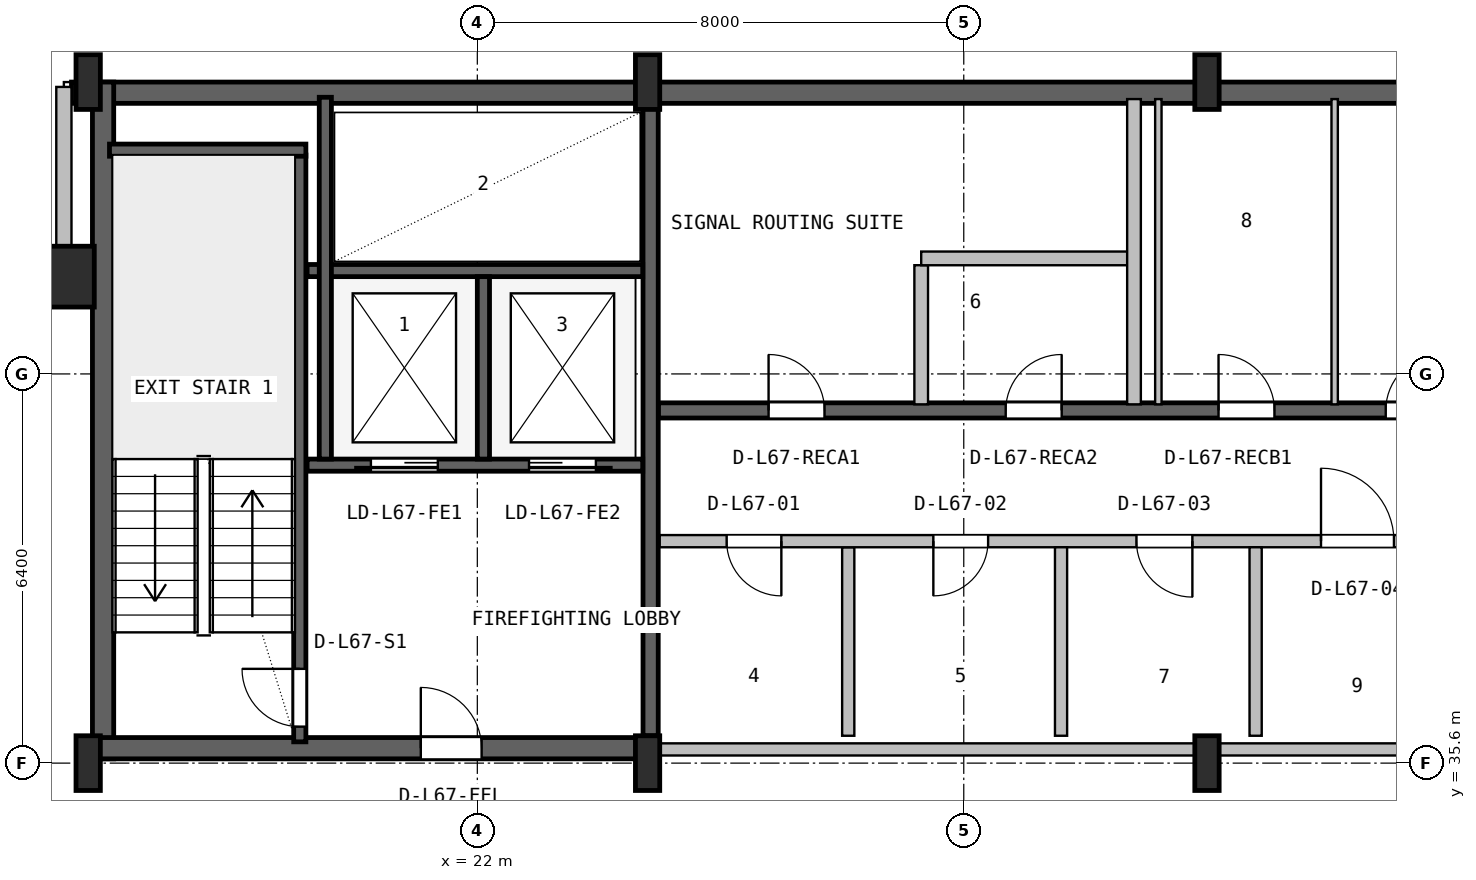
"""IFC4 building model, lengths in metres.
Left out: names, types, materials, properties, quantities, classifications, styles, units other than length and angle.
Written with IfcOpenShell. Run it as: python <this file> out.ifc"""

import sys

from ifc_helpers import new_model, si_unit, direction, frame, frame_2d, origin, origin_2d, place, context, subcontext, project, spatial, rectangle, hollow_rectangle, i_section, extrude, source, transform, mapped, element, fill, save


model = new_model("IFC4")
c1 = context("Model", 3, precision=1e-05, world=origin(), true_north=direction((0.0, 1.0)))
c2 = subcontext(c1, "Body", "Model", "MODEL_VIEW")
j1 = project(units=[si_unit("LENGTHUNIT", "METRE"), si_unit("PLANEANGLEUNIT", "RADIAN")], contexts=[c1])
p1 = place(None, origin())
s1 = spatial("IfcSite", under=j1, at=p1, CompositionType="ELEMENT")
p2 = place(p1, origin())
s2 = spatial("IfcBuilding", under=s1, at=p2, CompositionType="ELEMENT")
p3 = place(p2, frame((0.0, 0.0, 269.8)))
s3 = spatial("IfcBuildingStorey", under=s2, at=p3, CompositionType="ELEMENT", Elevation=269.8)
p4 = place(p3, frame((15.325, 46.625, 0.0), z_axis=(0.0, 0.0, 1.0), x_axis=(1.0, 0.0, 0.0)))
e1 = element("IfcWall", 1, at=p4, inside=s3, PredefinedType="SHEAR", context=c2, shape_type="SweptSolid", body=[
    extrude(rectangle(XDim=37.35, YDim=0.35, at=frame_2d((18.675, 0.0))), origin(), (0.0, 0.0, 1.0), 3.55),
])
p5 = place(p3, frame((15.845, 35.67, 0.0), z_axis=(0.0, 0.0, 1.0), x_axis=(0.0, 1.0, 0.0)))
e2 = element("IfcWall", 2, at=p5, inside=s3, PredefinedType="SHEAR", context=c2, shape_type="SweptSolid", body=[
    extrude(rectangle(XDim=11.13, YDim=0.35, at=frame_2d((5.565, 0.0))), origin(), (0.0, 0.0, 1.0), 3.55),
])
p6 = place(p3, frame((15.67, 35.845, 0.0), z_axis=(0.0, 0.0, 1.0), x_axis=(1.0, 0.0, 0.0)))
e3 = element("IfcWall", 3, at=p6, inside=s3, PredefinedType="SHEAR", context=c2, shape_type="SweptSolid", body=[
    extrude(rectangle(XDim=9.13, YDim=0.35, at=frame_2d((4.565, 0.0))), origin(), (0.0, 0.0, 1.0), 3.55),
])
p7 = place(p6, frame((5.4, 0.0, 0.0)))
e4 = element("IfcOpeningElement", 4, at=p7, cuts=e3, PredefinedType="OPENING", context=c2, shape_type="SweptSolid", body=[
    extrude(rectangle(XDim=1.0, YDim=2.1, at=frame_2d((0.5, 1.05))), frame((0.0, 0.185, 0.0), z_axis=(0.0, -1.0, 0.0), x_axis=(1.0, 0.0, 0.0)), (0.0, 0.0, 1.0), 0.37),
])
m1 = source(origin(), c2, "Body", "SweptSolid", [
    extrude(i_section(OverallWidth=0.4, OverallDepth=0.9, WebThickness=0.016, FlangeThickness=0.028, FilletRadius=0.016, at=origin_2d()), origin(), (0.0, 0.0, 1.0), 3.8),
])
for number, where, z_axis, x_axis in (
    (5, (15.6, 35.6, 0.0), (0.0, 0.0, 1.0), (1.0, 0.0, 0.0)),
    (6, (15.6, 46.8, 0.0), (0.0, 0.0, 1.0), (1.0, 0.0, 0.0)),
    (7, (24.8, 35.6, 0.0), (0.0, 0.0, 1.0), (1.0, 0.0, 0.0)),
    (8, (24.8, 46.8, 0.0), (0.0, 0.0, 1.0), (1.0, 0.0, 0.0)),
    (9, (34.0, 35.6, 0.0), (0.0, 0.0, 1.0), (1.0, 0.0, 0.0)),
    (10, (34.0, 46.8, 0.0), (0.0, 0.0, 1.0), (1.0, 0.0, 0.0)),
):
    element("IfcColumn", number, at=place(p3, frame(where, z_axis=z_axis, x_axis=x_axis)), inside=s3, PredefinedType="COLUMN", context=c2, shape_type="MappedRepresentation", body=[
        mapped(m1, transform((0.0, 0.0, 0.0), x_axis=(1.0, 0.0, 0.0), y_axis=(0.0, 1.0, 0.0), z_axis=(0.0, 0.0, 1.0), scale=1.0)),
    ])
m2 = source(origin(), c2, "Body", "SweptSolid", [
    extrude(hollow_rectangle(XDim=1.0, YDim=1.0, WallThickness=0.04, at=origin_2d()), origin(), (0.0, 0.0, 1.0), 3.8),
])
p8 = place(p3, frame((15.2, 43.6, 0.0), z_axis=(0.0, 0.0, 1.0), x_axis=(1.0, 0.0, 0.0)))
e11 = element("IfcColumn", 11, at=p8, inside=s3, PredefinedType="COLUMN", context=c2, shape_type="MappedRepresentation", body=[
    mapped(m2, transform((0.0, 0.0, 0.0), x_axis=(1.0, 0.0, 0.0), y_axis=(0.0, 1.0, 0.0), z_axis=(0.0, 0.0, 1.0), scale=1.0)),
])
p9 = place(p3, frame((12.08, 43.6, 0.0), z_axis=(0.0, 0.0, 1.0), x_axis=(1.0, 0.0, 0.0)))
e12 = element("IfcWall", 12, at=p9, inside=s3, PredefinedType="SOLIDWALL", context=c2, shape_type="SweptSolid", body=[
    extrude(rectangle(XDim=2.99, YDim=0.25, at=frame_2d((1.495, 0.0))), origin(), (0.0, 0.0, 1.0), 3.53),
])
p10 = place(p3, frame((15.2, 43.52, 0.0), z_axis=(0.0, 0.0, 1.0), x_axis=(0.0, 1.0, 0.0)))
e13 = element("IfcWall", 13, at=p10, inside=s3, PredefinedType="SOLIDWALL", context=c2, shape_type="SweptSolid", body=[
    extrude(rectangle(XDim=3.2, YDim=0.25, at=frame_2d((1.6, 0.0))), origin(), (0.0, 0.0, 1.0), 3.171),
])
p11 = place(p3, frame((19.08, 35.95, 0.0), z_axis=(0.0, 0.0, 1.0), x_axis=(0.0, 1.0, 0.0)))
e14 = element("IfcWall", 14, at=p11, inside=s3, PredefinedType="SHEAR", context=c2, shape_type="SweptSolid", body=[
    extrude(rectangle(XDim=9.65, YDim=0.2, at=frame_2d((4.825, 0.0))), origin(), (0.0, 0.0, 1.0), 3.55),
])
p12 = place(p11, frame((0.25, 0.0, 0.0)))
e15 = element("IfcOpeningElement", 15, at=p12, cuts=e14, PredefinedType="OPENING", context=c2, shape_type="SweptSolid", body=[
    extrude(rectangle(XDim=0.95, YDim=2.1, at=frame_2d((0.475, 1.05))), frame((0.0, 0.11, 0.0), z_axis=(0.0, -1.0, 0.0), x_axis=(1.0, 0.0, 0.0)), (0.0, 0.0, 1.0), 0.22),
])
p13 = place(p3, frame((15.95, 45.68, 0.0), z_axis=(0.0, 0.0, 1.0), x_axis=(1.0, 0.0, 0.0)))
e16 = element("IfcWall", 16, at=p13, inside=s3, PredefinedType="SHEAR", context=c2, shape_type="SweptSolid", body=[
    extrude(rectangle(XDim=3.23, YDim=0.2, at=frame_2d((1.615, 0.0))), origin(), (0.0, 0.0, 1.0), 3.55),
])
p14 = place(p3, frame((24.85, 36.05, 0.0), z_axis=(0.0, 0.0, 1.0), x_axis=(0.0, 1.0, 0.0)))
e17 = element("IfcWall", 17, at=p14, inside=s3, PredefinedType="SHEAR", context=c2, shape_type="SweptSolid", body=[
    extrude(rectangle(XDim=10.45, YDim=0.25, at=frame_2d((5.225, 0.0))), origin(), (0.0, 0.0, 1.0), 3.55),
])
p15 = place(p3, frame((19.2, 40.5, 0.0), z_axis=(0.0, 0.0, 1.0), x_axis=(1.0, 0.0, 0.0)))
e18 = element("IfcWall", 18, at=p15, inside=s3, PredefinedType="SHEAR", context=c2, shape_type="SweptSolid", body=[
    extrude(rectangle(XDim=5.52, YDim=0.2, at=frame_2d((2.76, 0.0))), origin(), (0.0, 0.0, 1.0), 3.55),
])
p16 = place(p15, frame((1.05, 0.0, 0.0)))
e19 = element("IfcOpeningElement", 19, at=p16, cuts=e18, PredefinedType="OPENING", context=c2, shape_type="SweptSolid", body=[
    extrude(rectangle(XDim=1.1, YDim=2.18, at=frame_2d((0.55, 1.09))), frame((0.0, 0.11, 0.0), z_axis=(0.0, -1.0, 0.0), x_axis=(1.0, 0.0, 0.0)), (0.0, 0.0, 1.0), 0.22),
])
p17 = place(p15, frame((3.65, 0.0, 0.0)))
e20 = element("IfcOpeningElement", 20, at=p17, cuts=e18, PredefinedType="OPENING", context=c2, shape_type="SweptSolid", body=[
    extrude(rectangle(XDim=1.1, YDim=2.18, at=frame_2d((0.55, 1.09))), frame((0.0, 0.11, 0.0), z_axis=(0.0, -1.0, 0.0), x_axis=(1.0, 0.0, 0.0)), (0.0, 0.0, 1.0), 0.22),
])
p18 = place(p3, frame((19.2, 43.7, 0.0), z_axis=(0.0, 0.0, 1.0), x_axis=(1.0, 0.0, 0.0)))
e21 = element("IfcWall", 21, at=p18, inside=s3, PredefinedType="SHEAR", context=c2, shape_type="SweptSolid", body=[
    extrude(rectangle(XDim=5.52, YDim=0.2, at=frame_2d((2.76, 0.0))), origin(), (0.0, 0.0, 1.0), 3.55),
])
p19 = place(p3, frame((22.1, 40.6, 0.0), z_axis=(0.0, 0.0, 1.0), x_axis=(0.0, 1.0, 0.0)))
e22 = element("IfcWall", 22, at=p19, inside=s3, PredefinedType="SHEAR", context=c2, shape_type="SweptSolid", body=[
    extrude(rectangle(XDim=3.0, YDim=0.2, at=frame_2d((1.5, 0.0))), origin(), (0.0, 0.0, 1.0), 3.55),
])
p20 = place(p3, frame((19.5, 40.6, 0.0), z_axis=(0.0, 0.0, 1.0), x_axis=(0.0, 1.0, 0.0)))
e23 = element("IfcWall", 23, at=p20, inside=s3, PredefinedType="SHEAR", context=c2, shape_type="SweptSolid", body=[
    extrude(rectangle(XDim=5.95, YDim=0.2, at=frame_2d((2.975, 0.0))), origin(), (0.0, 0.0, 1.0), 3.55),
])
p21 = place(p3, frame((24.98, 41.4, 0.0), z_axis=(0.0, 0.0, 1.0), x_axis=(1.0, 0.0, 0.0)))
e24 = element("IfcWall", 24, at=p21, inside=s3, PredefinedType="SHEAR", context=c2, shape_type="SweptSolid", body=[
    extrude(rectangle(XDim=23.82, YDim=0.25, at=frame_2d((11.91, 0.0))), origin(), (0.0, 0.0, 1.0), 3.55),
])
p22 = place(p21, frame((16.87, 0.0, 0.0)))
e25 = element("IfcOpeningElement", 25, at=p22, cuts=e24, PredefinedType="OPENING", context=c2, shape_type="SweptSolid", body=[
    extrude(rectangle(XDim=1.1, YDim=2.18, at=frame_2d((0.55, 1.09))), frame((0.0, 0.135, 0.0), z_axis=(0.0, -1.0, 0.0), x_axis=(1.0, 0.0, 0.0)), (0.0, 0.0, 1.0), 0.27),
])
p23 = place(p21, frame((19.47, 0.0, 0.0)))
e26 = element("IfcOpeningElement", 26, at=p23, cuts=e24, PredefinedType="OPENING", context=c2, shape_type="SweptSolid", body=[
    extrude(rectangle(XDim=1.1, YDim=2.18, at=frame_2d((0.55, 1.09))), frame((0.0, 0.135, 0.0), z_axis=(0.0, -1.0, 0.0), x_axis=(1.0, 0.0, 0.0)), (0.0, 0.0, 1.0), 0.27),
])
p24 = place(p21, frame((22.07, 0.0, 0.0)))
e27 = element("IfcOpeningElement", 27, at=p24, cuts=e24, PredefinedType="OPENING", context=c2, shape_type="SweptSolid", body=[
    extrude(rectangle(XDim=1.1, YDim=2.18, at=frame_2d((0.55, 1.09))), frame((0.0, 0.135, 0.0), z_axis=(0.0, -1.0, 0.0), x_axis=(1.0, 0.0, 0.0)), (0.0, 0.0, 1.0), 0.27),
])
p25 = place(p21, frame((1.81, 0.0, 0.0)))
e28 = element("IfcOpeningElement", 28, at=p25, cuts=e24, PredefinedType="OPENING", context=c2, shape_type="SweptSolid", body=[
    extrude(rectangle(XDim=0.92, YDim=2.08, at=frame_2d((0.46, 1.04))), frame((0.0, 0.135, 0.0), z_axis=(0.0, -1.0, 0.0), x_axis=(1.0, 0.0, 0.0)), (0.0, 0.0, 1.0), 0.27),
])
p26 = place(p21, frame((5.71, 0.0, 0.0)))
e29 = element("IfcOpeningElement", 29, at=p26, cuts=e24, PredefinedType="OPENING", context=c2, shape_type="SweptSolid", body=[
    extrude(rectangle(XDim=0.92, YDim=2.08, at=frame_2d((0.46, 1.04))), frame((0.0, 0.135, 0.0), z_axis=(0.0, -1.0, 0.0), x_axis=(1.0, 0.0, 0.0)), (0.0, 0.0, 1.0), 0.27),
])
p27 = place(p21, frame((9.21, 0.0, 0.0)))
e30 = element("IfcOpeningElement", 30, at=p27, cuts=e24, PredefinedType="OPENING", context=c2, shape_type="SweptSolid", body=[
    extrude(rectangle(XDim=0.92, YDim=2.08, at=frame_2d((0.46, 1.04))), frame((0.0, 0.135, 0.0), z_axis=(0.0, -1.0, 0.0), x_axis=(1.0, 0.0, 0.0)), (0.0, 0.0, 1.0), 0.27),
])
p28 = place(p21, frame((11.96, 0.0, 0.0)))
e31 = element("IfcOpeningElement", 31, at=p28, cuts=e24, PredefinedType="OPENING", context=c2, shape_type="SweptSolid", body=[
    extrude(rectangle(XDim=0.92, YDim=2.08, at=frame_2d((0.46, 1.04))), frame((0.0, 0.135, 0.0), z_axis=(0.0, -1.0, 0.0), x_axis=(1.0, 0.0, 0.0)), (0.0, 0.0, 1.0), 0.27),
])
p29 = place(p21, frame((14.31, 0.0, 0.0)))
e32 = element("IfcOpeningElement", 32, at=p29, cuts=e24, PredefinedType="OPENING", context=c2, shape_type="SweptSolid", body=[
    extrude(rectangle(XDim=0.92, YDim=2.08, at=frame_2d((0.46, 1.04))), frame((0.0, 0.135, 0.0), z_axis=(0.0, -1.0, 0.0), x_axis=(1.0, 0.0, 0.0)), (0.0, 0.0, 1.0), 0.27),
])
p30 = place(p3, frame((25.0, 35.825, 0.0), z_axis=(0.0, 0.0, 1.0), x_axis=(1.0, 0.0, 0.0)))
e33 = element("IfcWall", 33, at=p30, inside=s3, PredefinedType="SOLIDWALL", context=c2, shape_type="SweptSolid", body=[
    extrude(rectangle(XDim=12.95, YDim=0.2, at=frame_2d((6.475, 0.0))), origin(), (0.0, 0.0, 1.0), 2.575),
])
p31 = place(p3, frame((28.1, 36.05, 0.0), z_axis=(0.0, 0.0, 1.0), x_axis=(0.0, 1.0, 0.0)))
e34 = element("IfcWall", 34, at=p31, inside=s3, PredefinedType="PLUMBINGWALL", context=c2, shape_type="SweptSolid", body=[
    extrude(rectangle(XDim=3.1, YDim=0.2, at=frame_2d((1.55, 0.0))), origin(), (0.0, 0.0, 1.0), 3.53),
])
p32 = place(p3, frame((25.0, 39.25, 0.0), z_axis=(0.0, 0.0, 1.0), x_axis=(1.0, 0.0, 0.0)))
e35 = element("IfcWall", 35, at=p32, inside=s3, PredefinedType="SOLIDWALL", context=c2, shape_type="SweptSolid", body=[
    extrude(rectangle(XDim=12.95, YDim=0.2, at=frame_2d((6.475, 0.0))), origin(), (0.0, 0.0, 1.0), 3.53),
])
p33 = place(p32, frame((1.1, 0.0, 0.0)))
e36 = element("IfcOpeningElement", 36, at=p33, cuts=e35, PredefinedType="OPENING", context=c2, shape_type="SweptSolid", body=[
    extrude(rectangle(XDim=0.9, YDim=2.06, at=frame_2d((0.45, 1.03))), frame((0.0, 0.11, 0.0), z_axis=(0.0, -1.0, 0.0), x_axis=(1.0, 0.0, 0.0)), (0.0, 0.0, 1.0), 0.22),
])
p34 = place(p32, frame((4.5, 0.0, 0.0)))
e37 = element("IfcOpeningElement", 37, at=p34, cuts=e35, PredefinedType="OPENING", context=c2, shape_type="SweptSolid", body=[
    extrude(rectangle(XDim=0.9, YDim=2.06, at=frame_2d((0.45, 1.03))), frame((0.0, 0.11, 0.0), z_axis=(0.0, -1.0, 0.0), x_axis=(1.0, 0.0, 0.0)), (0.0, 0.0, 1.0), 0.22),
])
p35 = place(p32, frame((7.84, 0.0, 0.0)))
e38 = element("IfcOpeningElement", 38, at=p35, cuts=e35, PredefinedType="OPENING", context=c2, shape_type="SweptSolid", body=[
    extrude(rectangle(XDim=0.92, YDim=2.08, at=frame_2d((0.46, 1.04))), frame((0.0, 0.11, 0.0), z_axis=(0.0, -1.0, 0.0), x_axis=(1.0, 0.0, 0.0)), (0.0, 0.0, 1.0), 0.22),
])
p36 = place(p32, frame((10.875, 0.0, 0.0)))
e39 = element("IfcOpeningElement", 39, at=p36, cuts=e35, PredefinedType="OPENING", context=c2, shape_type="SweptSolid", body=[
    extrude(rectangle(XDim=1.2, YDim=2.1, at=frame_2d((0.6, 1.05))), frame((0.0, 0.11, 0.0), z_axis=(0.0, -1.0, 0.0), x_axis=(1.0, 0.0, 0.0)), (0.0, 0.0, 1.0), 0.22),
])
p37 = place(p3, frame((31.6, 36.05, 0.0), z_axis=(0.0, 0.0, 1.0), x_axis=(0.0, 1.0, 0.0)))
e40 = element("IfcWall", 40, at=p37, inside=s3, PredefinedType="PLUMBINGWALL", context=c2, shape_type="SweptSolid", body=[
    extrude(rectangle(XDim=3.1, YDim=0.2, at=frame_2d((1.55, 0.0))), origin(), (0.0, 0.0, 1.0), 3.53),
])
p38 = place(p3, frame((34.8, 36.05, 0.0), z_axis=(0.0, 0.0, 1.0), x_axis=(0.0, 1.0, 0.0)))
e41 = element("IfcWall", 41, at=p38, inside=s3, PredefinedType="SOLIDWALL", context=c2, shape_type="SweptSolid", body=[
    extrude(rectangle(XDim=3.1, YDim=0.2, at=frame_2d((1.55, 0.0))), origin(), (0.0, 0.0, 1.0), 3.53),
])
p39 = place(p3, frame((29.3, 41.5, 0.0), z_axis=(0.0, 0.0, 1.0), x_axis=(0.0, 1.0, 0.0)))
e42 = element("IfcWall", 42, at=p39, inside=s3, PredefinedType="PARTITIONING", context=c2, shape_type="SweptSolid", body=[
    extrude(rectangle(XDim=2.288, YDim=0.225, at=frame_2d((1.144, 0.0))), origin(), (0.0, 0.0, 1.0), 3.53),
])
p40 = place(p3, frame((29.3, 43.9, 0.0), z_axis=(0.0, 0.0, 1.0), x_axis=(1.0, 0.0, 0.0)))
e43 = element("IfcWall", 43, at=p40, inside=s3, PredefinedType="PARTITIONING", context=c2, shape_type="SweptSolid", body=[
    extrude(rectangle(XDim=3.5, YDim=0.225, at=frame_2d((1.75, 0.0))), origin(), (0.0, 0.0, 1.0), 3.53),
])
p41 = place(p3, frame((32.8, 41.5, 0.0), z_axis=(0.0, 0.0, 1.0), x_axis=(0.0, 1.0, 0.0)))
e44 = element("IfcWall", 44, at=p41, inside=s3, PredefinedType="PARTITIONING", context=c2, shape_type="SweptSolid", body=[
    extrude(rectangle(XDim=5.02, YDim=0.225, at=frame_2d((2.51, 0.0))), origin(), (0.0, 0.0, 1.0), 3.53),
])
for number, where, z_axis, x_axis in (
    (45, (36.1, 41.5, 0.0), (0.0, 0.0, 1.0), (0.0, 1.0, 0.0)),
    (46, (33.2, 41.5, 0.0), (0.0, 0.0, 1.0), (0.0, 1.0, 0.0)),
):
    element("IfcWall", number, at=place(p3, frame(where, z_axis=z_axis, x_axis=x_axis)), inside=s3, PredefinedType="PARTITIONING", context=c2, shape_type="SweptSolid", body=[
        extrude(rectangle(XDim=5.02, YDim=0.105, at=frame_2d((2.51, 0.0))), origin(), (0.0, 0.0, 1.0), 3.53),
    ])
m3 = source(origin(), c2, "Body", "SweptSolid", [
    extrude(rectangle(XDim=0.95, YDim=2.1, at=frame_2d((0.475, 1.05))), frame((0.0, 0.025, 0.0), z_axis=(0.0, -1.0, 0.0), x_axis=(1.0, 0.0, 0.0)), (0.0, 0.0, 1.0), 0.05),
])
p42 = place(p12, origin())
e47 = element("IfcDoor", 47, at=p42, inside=s3, OperationType="SINGLE_SWING_RIGHT", PredefinedType="DOOR", context=c2, shape_type="MappedRepresentation", body=[
    mapped(m3, transform((0.0, 0.0, 0.0), x_axis=(1.0, 0.0, 0.0), y_axis=(0.0, 1.0, 0.0), z_axis=(0.0, 0.0, 1.0), scale=1.0)),
])
fill(e15, e47)
m4 = source(origin(), c2, "Body", "SweptSolid", [
    extrude(rectangle(XDim=1.0, YDim=2.1, at=frame_2d((0.5, 1.05))), frame((0.0, 0.025, 0.0), z_axis=(0.0, -1.0, 0.0), x_axis=(1.0, 0.0, 0.0)), (0.0, 0.0, 1.0), 0.05),
])
p43 = place(p7, origin())
e48 = element("IfcDoor", 48, at=p43, inside=s3, OperationType="SINGLE_SWING_LEFT", PredefinedType="DOOR", context=c2, shape_type="MappedRepresentation", body=[
    mapped(m4, transform((0.0, 0.0, 0.0), x_axis=(1.0, 0.0, 0.0), y_axis=(0.0, 1.0, 0.0), z_axis=(0.0, 0.0, 1.0), scale=1.0)),
])
fill(e4, e48)
m5 = source(origin(), c2, "Body", "SweptSolid", [
    extrude(rectangle(XDim=1.1, YDim=2.18, at=frame_2d((0.55, 1.09))), frame((0.0, 0.025, 0.0), z_axis=(0.0, -1.0, 0.0), x_axis=(1.0, 0.0, 0.0)), (0.0, 0.0, 1.0), 0.05),
])
p44 = place(p16, frame((1.1, 0.0, 0.0), z_axis=(0.0, 0.0, 1.0), x_axis=(-1.0, 0.0, 0.0)))
e49 = element("IfcDoor", 49, at=p44, inside=s3, OperationType="SLIDING_TO_LEFT", PredefinedType="DOOR", context=c2, shape_type="MappedRepresentation", body=[
    mapped(m5, transform((0.0, 0.0, 0.0), x_axis=(1.0, 0.0, 0.0), y_axis=(0.0, 1.0, 0.0), z_axis=(0.0, 0.0, 1.0), scale=1.0)),
])
fill(e19, e49)
p45 = place(p17, frame((1.1, 0.0, 0.0), z_axis=(0.0, 0.0, 1.0), x_axis=(-1.0, 0.0, 0.0)))
e50 = element("IfcDoor", 50, at=p45, inside=s3, OperationType="SLIDING_TO_RIGHT", PredefinedType="DOOR", context=c2, shape_type="MappedRepresentation", body=[
    mapped(m5, transform((0.0, 0.0, 0.0), x_axis=(1.0, 0.0, 0.0), y_axis=(0.0, 1.0, 0.0), z_axis=(0.0, 0.0, 1.0), scale=1.0)),
])
fill(e20, e50)
m6 = source(origin(), c2, "Body", "SweptSolid", [
    extrude(rectangle(XDim=0.92, YDim=2.08, at=frame_2d((0.46, 1.04))), frame((0.0, 0.025, 0.0), z_axis=(0.0, -1.0, 0.0), x_axis=(1.0, 0.0, 0.0)), (0.0, 0.0, 1.0), 0.05),
])
p46 = place(p25, origin())
e51 = element("IfcDoor", 51, at=p46, inside=s3, OperationType="SINGLE_SWING_LEFT", PredefinedType="DOOR", context=c2, shape_type="MappedRepresentation", body=[
    mapped(m6, transform((0.0, 0.0, 0.0), x_axis=(1.0, 0.0, 0.0), y_axis=(0.0, 1.0, 0.0), z_axis=(0.0, 0.0, 1.0), scale=1.0)),
])
fill(e28, e51)
p47 = place(p26, origin())
e52 = element("IfcDoor", 52, at=p47, inside=s3, OperationType="SINGLE_SWING_RIGHT", PredefinedType="DOOR", context=c2, shape_type="MappedRepresentation", body=[
    mapped(m6, transform((0.0, 0.0, 0.0), x_axis=(1.0, 0.0, 0.0), y_axis=(0.0, 1.0, 0.0), z_axis=(0.0, 0.0, 1.0), scale=1.0)),
])
fill(e29, e52)
p48 = place(p27, origin())
e53 = element("IfcDoor", 53, at=p48, inside=s3, OperationType="SINGLE_SWING_LEFT", PredefinedType="DOOR", context=c2, shape_type="MappedRepresentation", body=[
    mapped(m6, transform((0.0, 0.0, 0.0), x_axis=(1.0, 0.0, 0.0), y_axis=(0.0, 1.0, 0.0), z_axis=(0.0, 0.0, 1.0), scale=1.0)),
])
fill(e30, e53)
p49 = place(p28, origin())
e54 = element("IfcDoor", 54, at=p49, inside=s3, OperationType="SINGLE_SWING_RIGHT", PredefinedType="DOOR", context=c2, shape_type="MappedRepresentation", body=[
    mapped(m6, transform((0.0, 0.0, 0.0), x_axis=(1.0, 0.0, 0.0), y_axis=(0.0, 1.0, 0.0), z_axis=(0.0, 0.0, 1.0), scale=1.0)),
])
fill(e31, e54)
m7 = source(origin(), c2, "Body", "SweptSolid", [
    extrude(rectangle(XDim=0.9, YDim=2.06, at=frame_2d((0.45, 1.03))), frame((0.0, 0.025, 0.0), z_axis=(0.0, -1.0, 0.0), x_axis=(1.0, 0.0, 0.0)), (0.0, 0.0, 1.0), 0.05),
])
p50 = place(p33, frame((0.9, 0.0, 0.0), z_axis=(0.0, 0.0, 1.0), x_axis=(-1.0, 0.0, 0.0)))
e55 = element("IfcDoor", 55, at=p50, inside=s3, OperationType="SINGLE_SWING_RIGHT", PredefinedType="DOOR", context=c2, shape_type="MappedRepresentation", body=[
    mapped(m7, transform((0.0, 0.0, 0.0), x_axis=(1.0, 0.0, 0.0), y_axis=(0.0, 1.0, 0.0), z_axis=(0.0, 0.0, 1.0), scale=1.0)),
])
fill(e36, e55)
p51 = place(p34, frame((0.9, 0.0, 0.0), z_axis=(0.0, 0.0, 1.0), x_axis=(-1.0, 0.0, 0.0)))
e56 = element("IfcDoor", 56, at=p51, inside=s3, OperationType="SINGLE_SWING_LEFT", PredefinedType="DOOR", context=c2, shape_type="MappedRepresentation", body=[
    mapped(m7, transform((0.0, 0.0, 0.0), x_axis=(1.0, 0.0, 0.0), y_axis=(0.0, 1.0, 0.0), z_axis=(0.0, 0.0, 1.0), scale=1.0)),
])
fill(e37, e56)
p52 = place(p35, frame((0.92, 0.0, 0.0), z_axis=(0.0, 0.0, 1.0), x_axis=(-1.0, 0.0, 0.0)))
e57 = element("IfcDoor", 57, at=p52, inside=s3, OperationType="SINGLE_SWING_RIGHT", PredefinedType="DOOR", context=c2, shape_type="MappedRepresentation", body=[
    mapped(m6, transform((0.0, 0.0, 0.0), x_axis=(1.0, 0.0, 0.0), y_axis=(0.0, 1.0, 0.0), z_axis=(0.0, 0.0, 1.0), scale=1.0)),
])
fill(e38, e57)
m8 = source(origin(), c2, "Body", "SweptSolid", [
    extrude(rectangle(XDim=1.2, YDim=2.1, at=frame_2d((0.6, 1.05))), frame((0.0, 0.025, 0.0), z_axis=(0.0, -1.0, 0.0), x_axis=(1.0, 0.0, 0.0)), (0.0, 0.0, 1.0), 0.05),
])
p53 = place(p36, origin())
e58 = element("IfcDoor", 58, at=p53, inside=s3, OperationType="SINGLE_SWING_LEFT", PredefinedType="DOOR", context=c2, shape_type="MappedRepresentation", body=[
    mapped(m8, transform((0.0, 0.0, 0.0), x_axis=(1.0, 0.0, 0.0), y_axis=(0.0, 1.0, 0.0), z_axis=(0.0, 0.0, 1.0), scale=1.0)),
])
fill(e39, e58)
save(model, sys.argv[1])
